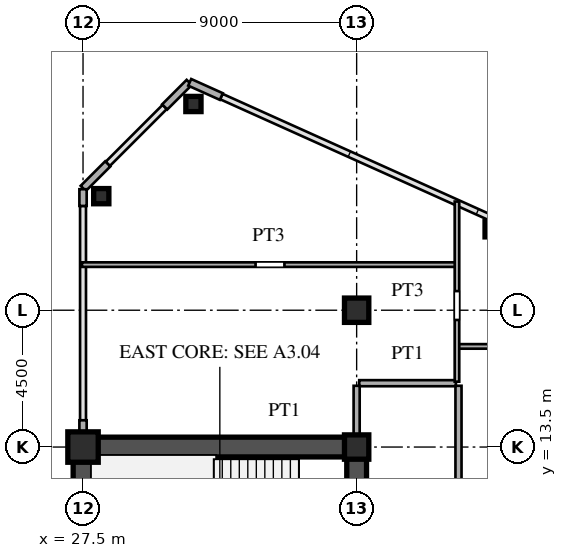
"""IFC4 building model, lengths in metres.
Left out: names, types, materials, properties, quantities, classifications, styles, units other than length and angle.
Written with IfcOpenShell. Run it as: python <this file> out.ifc"""

import sys

from ifc_helpers import new_model, si_unit, direction, frame, frame_2d, origin, origin_2d, place, context, subcontext, project, spatial, rectangle, hollow_rectangle, i_section, extrude, source, transform, mapped, element, save


model = new_model("IFC4")
c1 = context("Model", 3, precision=1e-05, world=origin(), true_north=direction((0.0, 1.0)))
c2 = subcontext(c1, "Body", "Model", "MODEL_VIEW")
j1 = project(units=[si_unit("LENGTHUNIT", "METRE"), si_unit("PLANEANGLEUNIT", "RADIAN")], contexts=[c1])
p1 = place(None, origin())
s1 = spatial("IfcSite", under=j1, at=p1, CompositionType="ELEMENT")
p2 = place(p1, origin())
s2 = spatial("IfcBuilding", under=s1, at=p2, CompositionType="ELEMENT")
p3 = place(p2, frame((0.0, 0.0, 72.9)))
s3 = spatial("IfcBuildingStorey", under=s2, at=p3, CompositionType="ELEMENT", Elevation=72.9)
m1 = source(origin(), c2, "Body", "SweptSolid", [
    extrude(hollow_rectangle(XDim=1.0, YDim=1.0, WallThickness=0.042, at=origin_2d()), origin(), (0.0, 0.0, 1.0), 3.6),
])
p4 = place(p3, frame((27.5, 13.5, 0.0), z_axis=(0.0, 0.0, 1.0), x_axis=(1.0, 0.0, 0.0)))
e1 = element("IfcColumn", 1, at=p4, inside=s3, PredefinedType="COLUMN", context=c2, shape_type="MappedRepresentation", body=[
    mapped(m1, transform((0.0, 0.0, 0.0), scale=1.0)),
])
m2 = source(origin(), c2, "Body", "SweptSolid", [
    extrude(i_section(OverallWidth=0.8, OverallDepth=0.8, WebThickness=0.032, FlangeThickness=0.05, at=origin_2d()), origin(), (0.0, 0.0, 1.0), 3.6),
])
for number, where, z_axis, x_axis in (
    (2, (36.5, 13.5, 0.0), (0.0, 0.0, 1.0), (1.0, 0.0, 0.0)),
    (3, (36.5, 18.0, 0.0), (0.0, 0.0, 1.0), (1.0, 0.0, 0.0)),
):
    element("IfcColumn", number, at=place(p3, frame(where, z_axis=z_axis, x_axis=x_axis)), inside=s3, PredefinedType="COLUMN", context=c2, shape_type="MappedRepresentation", body=[
        mapped(m2, transform((0.0, 0.0, 0.0), scale=1.0)),
    ])
m3 = source(origin(), c2, "Body", "SweptSolid", [
    extrude(hollow_rectangle(XDim=0.5, YDim=0.5, WallThickness=0.02, at=origin_2d()), origin(), (0.0, 0.0, 1.0), 3.6),
])
for number, where, z_axis, x_axis in (
    (4, (31.131, 24.783, 0.0), (0.0, 0.0, 1.0), (1.0, 0.0, 0.0)),
    (5, (28.1, 21.751, 0.0), (0.0, 0.0, 1.0), (1.0, 0.0, 0.0)),
    (6, (40.973, 20.661, 0.0), (0.0, 0.0, 1.0), (1.0, 0.0, 0.0)),
):
    element("IfcColumn", number, at=place(p3, frame(where, z_axis=z_axis, x_axis=x_axis)), inside=s3, PredefinedType="COLUMN", context=c2, shape_type="MappedRepresentation", body=[
        mapped(m3, transform((0.0, 0.0, 0.0), scale=1.0)),
    ])
p5 = place(p3, frame((32.049, 25.028, 0.0), z_axis=(0.0, 0.0, 1.0), x_axis=(-0.911929519623, 0.410346866979, 0.0)))
e7 = element("IfcWall", 7, at=p5, inside=s3, PredefinedType="SOLIDWALL", context=c2, shape_type="SweptSolid", body=[
    extrude(rectangle(XDim=1.14, YDim=0.24, at=frame_2d((0.57, 0.0))), origin(), (0.0, 0.0, 1.0), 3.38),
])
for number, where, z_axis, x_axis in (
    (8, (30.993, 25.493, 0.0), (0.0, 0.0, 1.0), (-0.707, -0.707, 0.0)),
    (9, (28.313, 22.813, 0.0), (0.0, 0.0, 1.0), (-0.707, -0.707, 0.0)),
):
    element("IfcWall", number, at=place(p3, frame(where, z_axis=z_axis, x_axis=x_axis)), inside=s3, PredefinedType="SOLIDWALL", context=c2, shape_type="SweptSolid", body=[
        extrude(rectangle(XDim=1.14, YDim=0.24, at=frame_2d((0.57, 0.0))), origin(), (0.0, 0.0, 1.0), 3.38),
    ])
p6 = place(p3, frame((27.5, 13.83, 0.0), z_axis=(0.0, 0.0, 1.0), x_axis=(0.0, 1.0, 0.0)))
e10 = element("IfcWall", 10, at=p6, inside=s3, PredefinedType="SOLIDWALL", context=c2, shape_type="SweptSolid", body=[
    extrude(rectangle(XDim=0.55, YDim=0.24, at=frame_2d((0.275, 0.0))), origin(), (0.0, 0.0, 1.0), 2.88),
])
p7 = place(p3, frame((27.5, 21.43, 0.0), z_axis=(0.0, 0.0, 1.0), x_axis=(0.0, 1.0, 0.0)))
e11 = element("IfcWall", 11, at=p7, inside=s3, PredefinedType="SOLIDWALL", context=c2, shape_type="SweptSolid", body=[
    extrude(rectangle(XDim=0.55, YDim=0.24, at=frame_2d((0.275, 0.0))), origin(), (0.0, 0.0, 1.0), 3.38),
])
p8 = place(p3, frame((27.5, 1.3, 0.0), z_axis=(0.0, 0.0, 1.0), x_axis=(0.0, 1.0, 0.0)))
e12 = element("IfcWall", 12, at=p8, inside=s3, PredefinedType="SHEAR", context=c2, shape_type="SweptSolid", body=[
    extrude(rectangle(XDim=12.2, YDim=0.65, at=frame_2d((6.1, 0.0))), origin(), (0.0, 0.0, 1.0), 3.38),
])
p9 = place(p3, frame((27.5, 13.5, 0.0), z_axis=(0.0, 0.0, 1.0), x_axis=(1.0, 0.0, 0.0)))
e13 = element("IfcWall", 13, at=p9, inside=s3, PredefinedType="SHEAR", context=c2, shape_type="SweptSolid", body=[
    extrude(rectangle(XDim=9.0, YDim=0.65, at=frame_2d((4.5, 0.0))), origin(), (0.0, 0.0, 1.0), 3.38),
])
p10 = place(p3, frame((36.5, 8.2, 0.0), z_axis=(0.0, 0.0, 1.0), x_axis=(0.0, 1.0, 0.0)))
e14 = element("IfcWall", 14, at=p10, inside=s3, PredefinedType="SHEAR", context=c2, shape_type="SweptSolid", body=[
    extrude(rectangle(XDim=5.45, YDim=0.65, at=frame_2d((2.725, 0.0))), origin(), (0.0, 0.0, 1.0), 3.38),
])
p11 = place(p10, frame((0.245, 0.0, 0.0)))
e15 = element("IfcOpeningElement", 15, at=p11, cuts=e14, PredefinedType="OPENING", context=c2, shape_type="SweptSolid", body=[
    extrude(rectangle(XDim=0.95, YDim=2.15, at=frame_2d((0.475, 1.075))), frame((0.0, 0.335, 0.0), z_axis=(0.0, -1.0, 0.0), x_axis=(1.0, 0.0, 0.0)), (0.0, 0.0, 1.0), 0.67),
])
p12 = place(p3, frame((36.585, 15.6, 0.0), z_axis=(0.0, 0.0, 1.0), x_axis=(1.0, 0.0, 0.0)))
e16 = element("IfcWall", 16, at=p12, inside=s3, PredefinedType="PARTITIONING", context=c2, shape_type="SweptSolid", body=[
    extrude(rectangle(XDim=3.18, YDim=0.2, at=frame_2d((1.59, 0.0))), origin(), (0.0, 0.0, 1.0), 3.38),
])
p13 = place(p3, frame((39.85, 16.81, 0.0), z_axis=(0.0, 0.0, 1.0), x_axis=(1.0, 0.0, 0.0)))
e17 = element("IfcWall", 17, at=p13, inside=s3, PredefinedType="PARTITIONING", context=c2, shape_type="SweptSolid", body=[
    extrude(rectangle(XDim=5.6, YDim=0.15, at=frame_2d((2.8, 0.0))), origin(), (0.0, 0.0, 1.0), 3.38),
])
p14 = place(p3, frame((27.465, 19.5, 0.0), z_axis=(0.0, 0.0, 1.0), x_axis=(1.0, 0.0, 0.0)))
e18 = element("IfcWall", 18, at=p14, inside=s3, PredefinedType="PARTITIONING", context=c2, shape_type="SweptSolid", body=[
    extrude(rectangle(XDim=12.285, YDim=0.15, at=frame_2d((6.143, 0.0))), origin(), (0.0, 0.0, 1.0), 3.38),
])
p15 = place(p14, frame((5.71, 0.0, 0.0)))
e19 = element("IfcOpeningElement", 19, at=p15, cuts=e18, PredefinedType="OPENING", context=c2, shape_type="SweptSolid", body=[
    extrude(rectangle(XDim=0.95, YDim=2.15, at=frame_2d((0.475, 1.075))), frame((0.0, 0.085, 0.0), z_axis=(0.0, -1.0, 0.0), x_axis=(1.0, 0.0, 0.0)), (0.0, 0.0, 1.0), 0.17),
])
p16 = place(p3, frame((36.5, 13.83, 0.0), z_axis=(0.0, 0.0, 1.0), x_axis=(0.0, 1.0, 0.0)))
e20 = element("IfcWall", 20, at=p16, inside=s3, PredefinedType="PARTITIONING", context=c2, shape_type="SweptSolid", body=[
    extrude(rectangle(XDim=1.685, YDim=0.2, at=frame_2d((0.842, 0.0))), origin(), (0.0, 0.0, 1.0), 2.68),
])
p17 = place(p3, frame((39.8, 15.65, 0.0), z_axis=(0.0, 0.0, 1.0), x_axis=(0.0, 1.0, 0.0)))
e21 = element("IfcWall", 21, at=p17, inside=s3, PredefinedType="PARTITIONING", context=c2, shape_type="SweptSolid", body=[
    extrude(rectangle(XDim=5.925, YDim=0.15, at=frame_2d((2.962, 0.0))), origin(), (0.0, 0.0, 1.0), 3.38),
])
p18 = place(p17, frame((2.029, 0.0, 0.0)))
e22 = element("IfcOpeningElement", 22, at=p18, cuts=e21, PredefinedType="OPENING", context=c2, shape_type="SweptSolid", body=[
    extrude(rectangle(XDim=0.95, YDim=2.15, at=frame_2d((0.475, 1.075))), frame((0.0, 0.085, 0.0), z_axis=(0.0, -1.0, 0.0), x_axis=(1.0, 0.0, 0.0)), (0.0, 0.0, 1.0), 0.17),
])
p19 = place(p3, frame((39.85, -15.515, 0.0), z_axis=(0.0, 0.0, 1.0), x_axis=(0.0, 1.0, 0.0)))
e23 = element("IfcWall", 23, at=p19, inside=s3, PredefinedType="PARTITIONING", context=c2, shape_type="SweptSolid", body=[
    extrude(rectangle(XDim=31.03, YDim=0.2, at=frame_2d((15.515, 0.0))), origin(), (0.0, 0.0, 1.0), 3.38),
])
p20 = place(p19, frame((2.94, 0.0, 0.0)))
e24 = element("IfcOpeningElement", 24, at=p20, cuts=e23, PredefinedType="OPENING", context=c2, shape_type="SweptSolid", body=[
    extrude(rectangle(XDim=1.05, YDim=2.25, at=frame_2d((0.525, 1.125))), frame((0.0, 0.11, 0.0), z_axis=(0.0, -1.0, 0.0), x_axis=(1.0, 0.0, 0.0)), (0.0, 0.0, 1.0), 0.22),
])
p21 = place(p19, frame((13.28, 0.0, 0.0)))
e25 = element("IfcOpeningElement", 25, at=p21, cuts=e23, PredefinedType="OPENING", context=c2, shape_type="SweptSolid", body=[
    extrude(rectangle(XDim=1.05, YDim=2.25, at=frame_2d((0.525, 1.125))), frame((0.0, 0.11, 0.0), z_axis=(0.0, -1.0, 0.0), x_axis=(1.0, 0.0, 0.0)), (0.0, 0.0, 1.0), 0.22),
])
p22 = place(p19, frame((25.567, 0.0, 0.0)))
e26 = element("IfcOpeningElement", 26, at=p22, cuts=e23, PredefinedType="OPENING", context=c2, shape_type="SweptSolid", body=[
    extrude(rectangle(XDim=1.05, YDim=2.25, at=frame_2d((0.525, 1.125))), frame((0.0, 0.11, 0.0), z_axis=(0.0, -1.0, 0.0), x_axis=(1.0, 0.0, 0.0)), (0.0, 0.0, 1.0), 0.22),
])
save(model, sys.argv[1])
